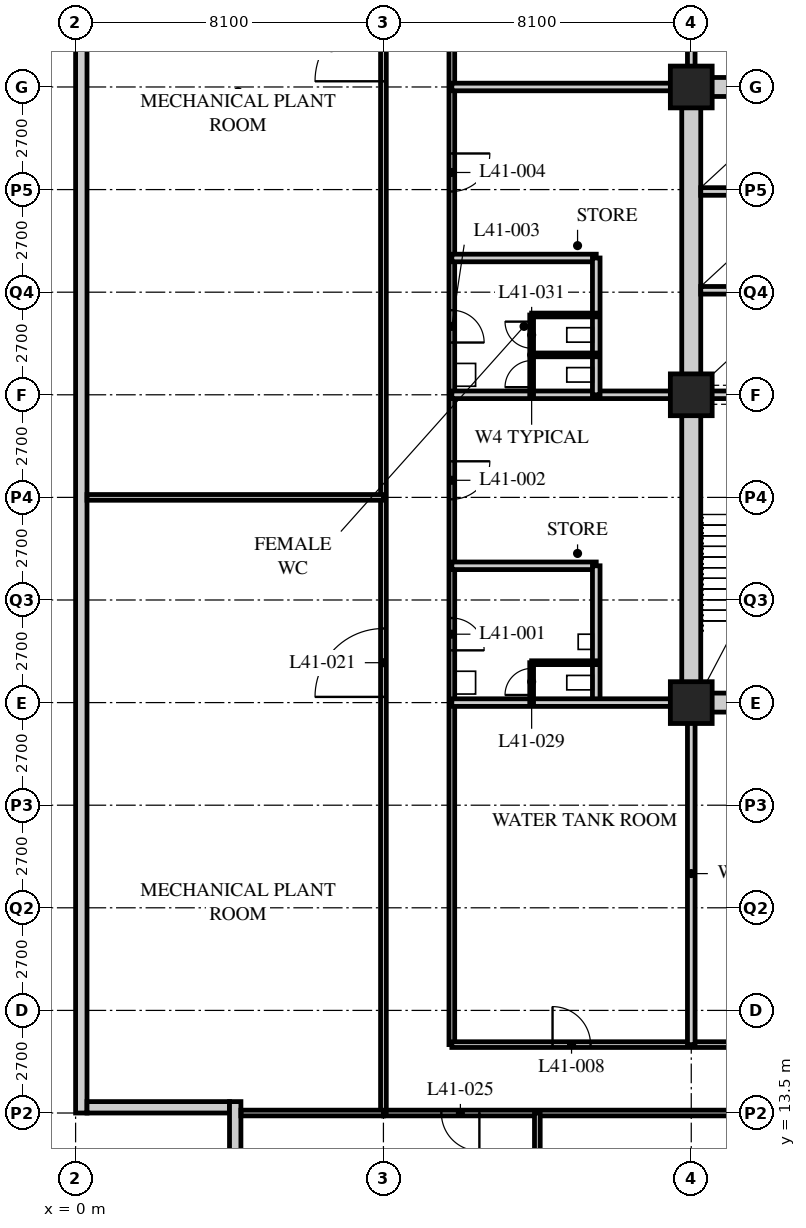
"""IFC4 building model, lengths in metres.
Left out: names, types, materials, properties, quantities, classifications, styles, units other than length and angle.
Written with IfcOpenShell. Run it as: python <this file> out.ifc"""

import sys

from ifc_helpers import new_model, si_unit, direction, frame, frame_2d, origin, origin_2d, place, context, subcontext, project, spatial, rectangle, hollow_rectangle, extrude, element, fill, save


model = new_model("IFC4")
c1 = context("Model", 3, precision=1e-05, world=origin(), true_north=direction((0.0, 1.0)))
c2 = subcontext(c1, "Body", "Model", "MODEL_VIEW")
j1 = project(units=[si_unit("LENGTHUNIT", "METRE"), si_unit("PLANEANGLEUNIT", "RADIAN")], contexts=[c1])
p1 = place(None, origin())
s1 = spatial("IfcSite", under=j1, at=p1, CompositionType="ELEMENT")
p2 = place(p1, origin())
s2 = spatial("IfcBuilding", under=s1, at=p2, CompositionType="ELEMENT")
p3 = place(p2, frame((0.0, 0.0, 157.8)))
s3 = spatial("IfcBuildingStorey", under=s2, at=p3, CompositionType="ELEMENT", Elevation=157.8)
for number, where, z_axis, x_axis in (
    (1, (16.2, 24.3, 0.0), (0.0, 0.0, 1.0), (1.0, 0.0, 0.0)),
    (2, (16.2, 32.4, 0.0), (0.0, 0.0, 1.0), (1.0, 0.0, 0.0)),
    (3, (16.2, 40.5, 0.0), (0.0, 0.0, 1.0), (1.0, 0.0, 0.0)),
):
    element("IfcColumn", number, at=place(p3, frame(where, z_axis=z_axis, x_axis=x_axis)), inside=s3, PredefinedType="COLUMN", context=c2, shape_type="SweptSolid", body=[
        extrude(hollow_rectangle(XDim=1.1, YDim=1.1, WallThickness=0.1, at=origin_2d()), origin(), (0.0, 0.0, 1.0), 7.2),
    ])
p4 = place(p3, frame((0.15, 45.6, 0.0), z_axis=(0.0, 0.0, 1.0), x_axis=(0.0, -1.0, 0.0)))
e4 = element("IfcWall", 4, at=p4, inside=s3, PredefinedType="SOLIDWALL", context=c2, shape_type="SweptSolid", body=[
    extrude(rectangle(XDim=32.1, YDim=0.3, at=frame_2d((16.05, 0.0))), origin(), (0.0, 0.0, 1.0), 5.95),
])
p5 = place(p3, frame((0.3, 13.65, 0.0), z_axis=(0.0, 0.0, 1.0), x_axis=(1.0, 0.0, 0.0)))
e5 = element("IfcWall", 5, at=p5, inside=s3, PredefinedType="SOLIDWALL", context=c2, shape_type="SweptSolid", body=[
    extrude(rectangle(XDim=3.75, YDim=0.3, at=frame_2d((1.875, 0.0))), origin(), (0.0, 0.0, 1.0), 6.95),
])
p6 = place(p3, frame((4.2, 13.8, 0.0), z_axis=(0.0, 0.0, 1.0), x_axis=(0.0, -1.0, 0.0)))
e6 = element("IfcWall", 6, at=p6, inside=s3, PredefinedType="SOLIDWALL", context=c2, shape_type="SweptSolid", body=[
    extrude(rectangle(XDim=4.35, YDim=0.3, at=frame_2d((2.175, 0.0))), origin(), (0.0, 0.0, 1.0), 6.25),
])
p7 = place(p3, frame((8.1, 13.5, 0.0), z_axis=(0.0, 0.0, 1.0), x_axis=(1.0, 0.0, 0.0)))
e7 = element("IfcWall", 7, at=p7, inside=s3, PredefinedType="PARTITIONING", context=c2, shape_type="SweptSolid", body=[
    extrude(rectangle(XDim=40.5, YDim=0.15, at=frame_2d((20.25, 0.0))), origin(), (0.0, 0.0, 1.0), 6.95),
])
p8 = place(p7, frame((11.25, 0.0, 0.0)))
e8 = element("IfcOpeningElement", 8, at=p8, cuts=e7, PredefinedType="OPENING", context=c2, shape_type="SweptSolid", body=[
    extrude(rectangle(XDim=1.8, YDim=2.4, at=frame_2d((0.9, 1.2))), frame((0.0, 0.085, 0.0), z_axis=(0.0, -1.0, 0.0), x_axis=(1.0, 0.0, 0.0)), (0.0, 0.0, 1.0), 0.17),
])
p9 = place(p7, frame((27.45, 0.0, 0.0)))
e9 = element("IfcOpeningElement", 9, at=p9, cuts=e7, PredefinedType="OPENING", context=c2, shape_type="SweptSolid", body=[
    extrude(rectangle(XDim=1.8, YDim=2.4, at=frame_2d((0.9, 1.2))), frame((0.0, 0.085, 0.0), z_axis=(0.0, -1.0, 0.0), x_axis=(1.0, 0.0, 0.0)), (0.0, 0.0, 1.0), 0.17),
])
p10 = place(p7, frame((1.525, 0.0, 0.0)))
e10 = element("IfcOpeningElement", 10, at=p10, cuts=e7, PredefinedType="OPENING", context=c2, shape_type="SweptSolid", body=[
    extrude(rectangle(XDim=1.0, YDim=2.1, at=frame_2d((0.5, 1.05))), frame((0.0, 0.085, 0.0), z_axis=(0.0, -1.0, 0.0), x_axis=(1.0, 0.0, 0.0)), (0.0, 0.0, 1.0), 0.17),
])
p11 = place(p7, frame((37.975, 0.0, 0.0)))
e11 = element("IfcOpeningElement", 11, at=p11, cuts=e7, PredefinedType="OPENING", context=c2, shape_type="SweptSolid", body=[
    extrude(rectangle(XDim=1.0, YDim=2.1, at=frame_2d((0.5, 1.05))), frame((0.0, 0.085, 0.0), z_axis=(0.0, -1.0, 0.0), x_axis=(1.0, 0.0, 0.0)), (0.0, 0.0, 1.0), 0.17),
])
p12 = place(p3, frame((8.1, 13.5, 0.0), z_axis=(0.0, 0.0, 1.0), x_axis=(0.0, 1.0, 0.0)))
e12 = element("IfcWall", 12, at=p12, inside=s3, PredefinedType="PARTITIONING", context=c2, shape_type="SweptSolid", body=[
    extrude(rectangle(XDim=32.4, YDim=0.15, at=frame_2d((16.2, 0.0))), origin(), (0.0, 0.0, 1.0), 5.95),
])
p13 = place(p12, frame((10.95, 0.0, 0.0)))
e13 = element("IfcOpeningElement", 13, at=p13, cuts=e12, PredefinedType="OPENING", context=c2, shape_type="SweptSolid", body=[
    extrude(rectangle(XDim=1.8, YDim=2.4, at=frame_2d((0.9, 1.2))), frame((0.0, 0.085, 0.0), z_axis=(0.0, -1.0, 0.0), x_axis=(1.0, 0.0, 0.0)), (0.0, 0.0, 1.0), 0.17),
])
p14 = place(p12, frame((27.15, 0.0, 0.0)))
e14 = element("IfcOpeningElement", 14, at=p14, cuts=e12, PredefinedType="OPENING", context=c2, shape_type="SweptSolid", body=[
    extrude(rectangle(XDim=1.8, YDim=2.4, at=frame_2d((0.9, 1.2))), frame((0.0, 0.085, 0.0), z_axis=(0.0, -1.0, 0.0), x_axis=(1.0, 0.0, 0.0)), (0.0, 0.0, 1.0), 0.17),
])
p15 = place(p3, frame((9.9, 44.1, 0.0), z_axis=(0.0, 0.0, 1.0), x_axis=(0.0, -1.0, 0.0)))
e15 = element("IfcWall", 15, at=p15, inside=s3, PredefinedType="PARTITIONING", context=c2, shape_type="SweptSolid", body=[
    extrude(rectangle(XDim=28.8, YDim=0.15, at=frame_2d((14.4, 0.0))), origin(), (0.0, 0.0, 1.0), 6.95),
])
p16 = place(p15, frame((17.575, 0.0, 0.0)))
e16 = element("IfcOpeningElement", 16, at=p16, cuts=e15, PredefinedType="OPENING", context=c2, shape_type="SweptSolid", body=[
    extrude(rectangle(XDim=0.85, YDim=2.1, at=frame_2d((0.425, 1.05))), frame((0.0, 0.085, 0.0), z_axis=(0.0, -1.0, 0.0), x_axis=(1.0, 0.0, 0.0)), (0.0, 0.0, 1.0), 0.17),
])
p17 = place(p15, frame((13.45, 0.0, 0.0)))
e17 = element("IfcOpeningElement", 17, at=p17, cuts=e15, PredefinedType="OPENING", context=c2, shape_type="SweptSolid", body=[
    extrude(rectangle(XDim=1.0, YDim=2.1, at=frame_2d((0.5, 1.05))), frame((0.0, 0.085, 0.0), z_axis=(0.0, -1.0, 0.0), x_axis=(1.0, 0.0, 0.0)), (0.0, 0.0, 1.0), 0.17),
])
p18 = place(p15, frame((9.475, 0.0, 0.0)))
e18 = element("IfcOpeningElement", 18, at=p18, cuts=e15, PredefinedType="OPENING", context=c2, shape_type="SweptSolid", body=[
    extrude(rectangle(XDim=0.85, YDim=2.1, at=frame_2d((0.425, 1.05))), frame((0.0, 0.085, 0.0), z_axis=(0.0, -1.0, 0.0), x_axis=(1.0, 0.0, 0.0)), (0.0, 0.0, 1.0), 0.17),
])
p19 = place(p15, frame((5.35, 0.0, 0.0)))
e19 = element("IfcOpeningElement", 19, at=p19, cuts=e15, PredefinedType="OPENING", context=c2, shape_type="SweptSolid", body=[
    extrude(rectangle(XDim=1.0, YDim=2.1, at=frame_2d((0.5, 1.05))), frame((0.0, 0.085, 0.0), z_axis=(0.0, -1.0, 0.0), x_axis=(1.0, 0.0, 0.0)), (0.0, 0.0, 1.0), 0.17),
])
p20 = place(p3, frame((9.9, 15.3, 0.0), z_axis=(0.0, 0.0, 1.0), x_axis=(1.0, 0.0, 0.0)))
e20 = element("IfcWall", 20, at=p20, inside=s3, PredefinedType="PARTITIONING", context=c2, shape_type="SweptSolid", body=[
    extrude(rectangle(XDim=17.24, YDim=0.15, at=frame_2d((8.62, 0.0))), origin(), (0.0, 0.0, 1.0), 6.95),
])
p21 = place(p20, frame((2.65, 0.0, 0.0)))
e21 = element("IfcOpeningElement", 21, at=p21, cuts=e20, PredefinedType="OPENING", context=c2, shape_type="SweptSolid", body=[
    extrude(rectangle(XDim=1.0, YDim=2.1, at=frame_2d((0.5, 1.05))), frame((0.0, 0.085, 0.0), z_axis=(0.0, -1.0, 0.0), x_axis=(1.0, 0.0, 0.0)), (0.0, 0.0, 1.0), 0.17),
])
p22 = place(p20, frame((11.275, 0.0, 0.0)))
e22 = element("IfcOpeningElement", 22, at=p22, cuts=e20, PredefinedType="OPENING", context=c2, shape_type="SweptSolid", body=[
    extrude(rectangle(XDim=1.0, YDim=2.1, at=frame_2d((0.5, 1.05))), frame((0.0, 0.085, 0.0), z_axis=(0.0, -1.0, 0.0), x_axis=(1.0, 0.0, 0.0)), (0.0, 0.0, 1.0), 0.17),
])
p23 = place(p3, frame((9.9, 32.4, 0.0), z_axis=(0.0, 0.0, 1.0), x_axis=(1.0, 0.0, 0.0)))
e23 = element("IfcWall", 23, at=p23, inside=s3, PredefinedType="SOLIDWALL", context=c2, shape_type="SweptSolid", body=[
    extrude(rectangle(XDim=6.3, YDim=0.2, at=frame_2d((3.15, 0.0))), origin(), (0.0, 0.0, 1.0), 6.95),
])
p24 = place(p3, frame((9.9, 27.9, 0.0), z_axis=(0.0, 0.0, 1.0), x_axis=(1.0, 0.0, 0.0)))
e24 = element("IfcWall", 24, at=p24, inside=s3, PredefinedType="SOLIDWALL", context=c2, shape_type="SweptSolid", body=[
    extrude(rectangle(XDim=3.8, YDim=0.2, at=frame_2d((1.9, 0.0))), origin(), (0.0, 0.0, 1.0), 6.95),
])
p25 = place(p3, frame((13.7, 24.3, 0.0), z_axis=(0.0, 0.0, 1.0), x_axis=(0.0, 1.0, 0.0)))
e25 = element("IfcWall", 25, at=p25, inside=s3, PredefinedType="SOLIDWALL", context=c2, shape_type="SweptSolid", body=[
    extrude(rectangle(XDim=3.6, YDim=0.2, at=frame_2d((1.8, 0.0))), origin(), (0.0, 0.0, 1.0), 6.95),
])
p26 = place(p3, frame((9.9, 36.0, 0.0), z_axis=(0.0, 0.0, 1.0), x_axis=(1.0, 0.0, 0.0)))
e26 = element("IfcWall", 26, at=p26, inside=s3, PredefinedType="SOLIDWALL", context=c2, shape_type="SweptSolid", body=[
    extrude(rectangle(XDim=3.8, YDim=0.2, at=frame_2d((1.9, 0.0))), origin(), (0.0, 0.0, 1.0), 6.95),
])
p27 = place(p3, frame((13.7, 32.4, 0.0), z_axis=(0.0, 0.0, 1.0), x_axis=(0.0, 1.0, 0.0)))
e27 = element("IfcWall", 27, at=p27, inside=s3, PredefinedType="SOLIDWALL", context=c2, shape_type="SweptSolid", body=[
    extrude(rectangle(XDim=3.6, YDim=0.2, at=frame_2d((1.8, 0.0))), origin(), (0.0, 0.0, 1.0), 6.95),
])
p28 = place(p3, frame((16.2, 15.3, 0.0), z_axis=(0.0, 0.0, 1.0), x_axis=(0.0, 1.0, 0.0)))
e28 = element("IfcWall", 28, at=p28, inside=s3, PredefinedType="SOLIDWALL", context=c2, shape_type="SweptSolid", body=[
    extrude(rectangle(XDim=9.0, YDim=0.2, at=frame_2d((4.5, 0.0))), origin(), (0.0, 0.0, 1.0), 5.95),
])
p29 = place(p3, frame((16.2, 40.5, 0.0), z_axis=(0.0, 0.0, 1.0), x_axis=(0.0, 1.0, 0.0)))
e29 = element("IfcWall", 29, at=p29, inside=s3, PredefinedType="SOLIDWALL", context=c2, shape_type="SweptSolid", body=[
    extrude(rectangle(XDim=3.6, YDim=0.2, at=frame_2d((1.8, 0.0))), origin(), (0.0, 0.0, 1.0), 5.95),
])
for number, where, z_axis, x_axis in (
    (30, (9.9, 24.3, 0.0), (0.0, 0.0, 1.0), (1.0, 0.0, 0.0)),
    (31, (9.9, 40.5, 0.0), (0.0, 0.0, 1.0), (1.0, 0.0, 0.0)),
):
    element("IfcWall", number, at=place(p3, frame(where, z_axis=z_axis, x_axis=x_axis)), inside=s3, PredefinedType="SOLIDWALL", context=c2, shape_type="SweptSolid", body=[
        extrude(rectangle(XDim=6.3, YDim=0.2, at=frame_2d((3.15, 0.0))), origin(), (0.0, 0.0, 1.0), 6.95),
    ])
p30 = place(p3, frame((8.1, 29.7, 0.0), z_axis=(0.0, 0.0, 1.0), x_axis=(-1.0, 0.0, 0.0)))
e32 = element("IfcWall", 32, at=p30, inside=s3, PredefinedType="PARTITIONING", context=c2, shape_type="SweptSolid", body=[
    extrude(rectangle(XDim=7.8, YDim=0.15, at=frame_2d((3.9, 0.0))), origin(), (0.0, 0.0, 1.0), 6.95),
])
p31 = place(p3, frame((4.35, 13.5, 0.0), z_axis=(0.0, 0.0, 1.0), x_axis=(1.0, 0.0, 0.0)))
e33 = element("IfcWall", 33, at=p31, inside=s3, PredefinedType="PARTITIONING", context=c2, shape_type="SweptSolid", body=[
    extrude(rectangle(XDim=3.75, YDim=0.15, at=frame_2d((1.875, 0.0))), origin(), (0.0, 0.0, 1.0), 6.95),
])
p32 = place(p3, frame((12.15, 13.5, 0.0), z_axis=(0.0, 0.0, 1.0), x_axis=(0.0, -1.0, 0.0)))
e34 = element("IfcWall", 34, at=p32, inside=s3, PredefinedType="PARTITIONING", context=c2, shape_type="SweptSolid", body=[
    extrude(rectangle(XDim=7.8, YDim=0.15, at=frame_2d((3.9, 0.0))), origin(), (0.0, 0.0, 1.0), 6.95),
])
p33 = place(p3, frame((12.0, 24.3, 0.0), z_axis=(0.0, 0.0, 1.0), x_axis=(0.0, 1.0, 0.0)))
e35 = element("IfcWall", 35, at=p33, inside=s3, PredefinedType="PARTITIONING", context=c2, shape_type="SweptSolid", body=[
    extrude(rectangle(XDim=1.05, YDim=0.1, at=frame_2d((0.525, 0.0))), origin(), (0.0, 0.0, 1.0), 6.95),
])
p34 = place(p33, frame((0.2, 0.0, 0.0)))
e36 = element("IfcOpeningElement", 36, at=p34, cuts=e35, PredefinedType="OPENING", context=c2, shape_type="SweptSolid", body=[
    extrude(rectangle(XDim=0.7, YDim=2.0, at=frame_2d((0.35, 1.0))), frame((0.0, 0.06, 0.0), z_axis=(0.0, -1.0, 0.0), x_axis=(1.0, 0.0, 0.0)), (0.0, 0.0, 1.0), 0.12),
])
p35 = place(p3, frame((12.0, 25.35, 0.0), z_axis=(0.0, 0.0, 1.0), x_axis=(1.0, 0.0, 0.0)))
e37 = element("IfcWall", 37, at=p35, inside=s3, PredefinedType="PARTITIONING", context=c2, shape_type="SweptSolid", body=[
    extrude(rectangle(XDim=1.7, YDim=0.1, at=frame_2d((0.85, 0.0))), origin(), (0.0, 0.0, 1.0), 6.95),
])
p36 = place(p3, frame((12.0, 32.4, 0.0), z_axis=(0.0, 0.0, 1.0), x_axis=(0.0, 1.0, 0.0)))
e38 = element("IfcWall", 38, at=p36, inside=s3, PredefinedType="PARTITIONING", context=c2, shape_type="SweptSolid", body=[
    extrude(rectangle(XDim=2.1, YDim=0.1, at=frame_2d((1.05, 0.0))), origin(), (0.0, 0.0, 1.0), 6.95),
])
p37 = place(p36, frame((0.2, 0.0, 0.0)))
e39 = element("IfcOpeningElement", 39, at=p37, cuts=e38, PredefinedType="OPENING", context=c2, shape_type="SweptSolid", body=[
    extrude(rectangle(XDim=0.7, YDim=2.0, at=frame_2d((0.35, 1.0))), frame((0.0, 0.06, 0.0), z_axis=(0.0, -1.0, 0.0), x_axis=(1.0, 0.0, 0.0)), (0.0, 0.0, 1.0), 0.12),
])
p38 = place(p36, frame((1.225, 0.0, 0.0)))
e40 = element("IfcOpeningElement", 40, at=p38, cuts=e38, PredefinedType="OPENING", context=c2, shape_type="SweptSolid", body=[
    extrude(rectangle(XDim=0.7, YDim=2.0, at=frame_2d((0.35, 1.0))), frame((0.0, 0.06, 0.0), z_axis=(0.0, -1.0, 0.0), x_axis=(1.0, 0.0, 0.0)), (0.0, 0.0, 1.0), 0.12),
])
for number, where, z_axis, x_axis in (
    (41, (12.0, 33.45, 0.0), (0.0, 0.0, 1.0), (1.0, 0.0, 0.0)),
    (42, (12.0, 34.5, 0.0), (0.0, 0.0, 1.0), (1.0, 0.0, 0.0)),
):
    element("IfcWall", number, at=place(p3, frame(where, z_axis=z_axis, x_axis=x_axis)), inside=s3, PredefinedType="PARTITIONING", context=c2, shape_type="SweptSolid", body=[
        extrude(rectangle(XDim=1.7, YDim=0.1, at=frame_2d((0.85, 0.0))), origin(), (0.0, 0.0, 1.0), 6.95),
    ])
p39 = place(p3, frame((15.95, 24.3, 0.0), z_axis=(0.0, 0.0, 1.0), x_axis=(1.0, 0.0, 0.0)))
e43 = element("IfcWall", 43, at=p39, inside=s3, PredefinedType="SOLIDWALL", context=c2, shape_type="SweptSolid", body=[
    extrude(rectangle(XDim=24.8, YDim=0.5, at=frame_2d((12.4, 0.0))), origin(), (0.0, 0.0, 1.0), 6.18),
])
p40 = place(p39, frame((11.5, 0.0, 0.0)))
e44 = element("IfcOpeningElement", 44, at=p40, cuts=e43, PredefinedType="OPENING", context=c2, shape_type="SweptSolid", body=[
    extrude(rectangle(XDim=1.8, YDim=2.4, at=frame_2d((0.9, 1.2))), frame((0.0, 0.26, 0.0), z_axis=(0.0, -1.0, 0.0), x_axis=(1.0, 0.0, 0.0)), (0.0, 0.0, 1.0), 0.52),
])
p41 = place(p3, frame((15.95, 40.5, 0.0), z_axis=(0.0, 0.0, 1.0), x_axis=(1.0, 0.0, 0.0)))
e45 = element("IfcWall", 45, at=p41, inside=s3, PredefinedType="SOLIDWALL", context=c2, shape_type="SweptSolid", body=[
    extrude(rectangle(XDim=24.8, YDim=0.5, at=frame_2d((12.4, 0.0))), origin(), (0.0, 0.0, 1.0), 6.18),
])
p42 = place(p41, frame((11.5, 0.0, 0.0)))
e46 = element("IfcOpeningElement", 46, at=p42, cuts=e45, PredefinedType="OPENING", context=c2, shape_type="SweptSolid", body=[
    extrude(rectangle(XDim=1.8, YDim=2.4, at=frame_2d((0.9, 1.2))), frame((0.0, 0.26, 0.0), z_axis=(0.0, -1.0, 0.0), x_axis=(1.0, 0.0, 0.0)), (0.0, 0.0, 1.0), 0.52),
])
p43 = place(p3, frame((16.2, 24.55, 0.0), z_axis=(0.0, 0.0, 1.0), x_axis=(0.0, 1.0, 0.0)))
e47 = element("IfcWall", 47, at=p43, inside=s3, PredefinedType="SOLIDWALL", context=c2, shape_type="SweptSolid", body=[
    extrude(rectangle(XDim=15.7, YDim=0.5, at=frame_2d((7.85, 0.0))), origin(), (0.0, 0.0, 1.0), 5.95),
])
p44 = place(p3, frame((16.45, 32.4, 0.0), z_axis=(0.0, 0.0, 1.0), x_axis=(1.0, 0.0, 0.0)))
e48 = element("IfcWall", 48, at=p44, inside=s3, PredefinedType="SOLIDWALL", context=c2, shape_type="SweptSolid", body=[
    extrude(rectangle(XDim=7.95, YDim=0.2, at=frame_2d((3.975, 0.0))), origin(), (0.0, 0.0, 1.0), 6.25),
])
for number, where, z_axis, x_axis in (
    (49, (16.45, 35.15, 0.0), (0.0, 0.0, 1.0), (1.0, 0.0, 0.0)),
    (50, (16.45, 37.75, 0.0), (0.0, 0.0, 1.0), (1.0, 0.0, 0.0)),
):
    element("IfcWall", number, at=place(p3, frame(where, z_axis=z_axis, x_axis=x_axis)), inside=s3, PredefinedType="SOLIDWALL", context=c2, shape_type="SweptSolid", body=[
        extrude(rectangle(XDim=2.6, YDim=0.2, at=frame_2d((1.3, 0.0))), origin(), (0.0, 0.0, 1.0), 6.95),
    ])
p45 = place(p16, origin())
e51 = element("IfcDoor", 51, at=p45, inside=s3, OperationType="SINGLE_SWING_RIGHT", PredefinedType="DOOR", context=c2, shape_type="SweptSolid", body=[
    extrude(rectangle(XDim=0.85, YDim=2.1, at=frame_2d((0.425, 1.05))), frame((0.0, 0.025, 0.0), z_axis=(0.0, -1.0, 0.0), x_axis=(1.0, 0.0, 0.0)), (0.0, 0.0, 1.0), 0.05),
])
fill(e16, e51)
p46 = place(p17, origin())
e52 = element("IfcDoor", 52, at=p46, inside=s3, OperationType="SINGLE_SWING_LEFT", PredefinedType="DOOR", context=c2, shape_type="SweptSolid", body=[
    extrude(rectangle(XDim=1.0, YDim=2.1, at=frame_2d((0.5, 1.05))), frame((0.0, 0.025, 0.0), z_axis=(0.0, -1.0, 0.0), x_axis=(1.0, 0.0, 0.0)), (0.0, 0.0, 1.0), 0.05),
])
fill(e17, e52)
p47 = place(p18, origin())
e53 = element("IfcDoor", 53, at=p47, inside=s3, OperationType="SINGLE_SWING_RIGHT", PredefinedType="DOOR", context=c2, shape_type="SweptSolid", body=[
    extrude(rectangle(XDim=0.85, YDim=2.1, at=frame_2d((0.425, 1.05))), frame((0.0, 0.025, 0.0), z_axis=(0.0, -1.0, 0.0), x_axis=(1.0, 0.0, 0.0)), (0.0, 0.0, 1.0), 0.05),
])
fill(e18, e53)
p48 = place(p19, origin())
e54 = element("IfcDoor", 54, at=p48, inside=s3, OperationType="SINGLE_SWING_LEFT", PredefinedType="DOOR", context=c2, shape_type="SweptSolid", body=[
    extrude(rectangle(XDim=1.0, YDim=2.1, at=frame_2d((0.5, 1.05))), frame((0.0, 0.025, 0.0), z_axis=(0.0, -1.0, 0.0), x_axis=(1.0, 0.0, 0.0)), (0.0, 0.0, 1.0), 0.05),
])
fill(e19, e54)
p49 = place(p21, origin())
e55 = element("IfcDoor", 55, at=p49, inside=s3, OperationType="SINGLE_SWING_LEFT", PredefinedType="DOOR", context=c2, shape_type="SweptSolid", body=[
    extrude(rectangle(XDim=1.0, YDim=2.1, at=frame_2d((0.5, 1.05))), frame((0.0, 0.025, 0.0), z_axis=(0.0, -1.0, 0.0), x_axis=(1.0, 0.0, 0.0)), (0.0, 0.0, 1.0), 0.05),
])
fill(e21, e55)
p50 = place(p13, origin())
e56 = element("IfcDoor", 56, at=p50, inside=s3, OperationType="DOUBLE_DOOR_SINGLE_SWING", PredefinedType="DOOR", context=c2, shape_type="SweptSolid", body=[
    extrude(rectangle(XDim=1.8, YDim=2.4, at=frame_2d((0.9, 1.2))), frame((0.0, 0.025, 0.0), z_axis=(0.0, -1.0, 0.0), x_axis=(1.0, 0.0, 0.0)), (0.0, 0.0, 1.0), 0.05),
])
fill(e13, e56)
p51 = place(p14, origin())
e57 = element("IfcDoor", 57, at=p51, inside=s3, OperationType="DOUBLE_DOOR_SINGLE_SWING", PredefinedType="DOOR", context=c2, shape_type="SweptSolid", body=[
    extrude(rectangle(XDim=1.8, YDim=2.4, at=frame_2d((0.9, 1.2))), frame((0.0, 0.025, 0.0), z_axis=(0.0, -1.0, 0.0), x_axis=(1.0, 0.0, 0.0)), (0.0, 0.0, 1.0), 0.05),
])
fill(e14, e57)
p52 = place(p10, origin())
e58 = element("IfcDoor", 58, at=p52, inside=s3, OperationType="SINGLE_SWING_LEFT", PredefinedType="DOOR", context=c2, shape_type="SweptSolid", body=[
    extrude(rectangle(XDim=1.0, YDim=2.1, at=frame_2d((0.5, 1.05))), frame((0.0, 0.025, 0.0), z_axis=(0.0, -1.0, 0.0), x_axis=(1.0, 0.0, 0.0)), (0.0, 0.0, 1.0), 0.05),
])
fill(e10, e58)
p53 = place(p34, origin())
e59 = element("IfcDoor", 59, at=p53, inside=s3, OperationType="SINGLE_SWING_LEFT", PredefinedType="DOOR", context=c2, shape_type="SweptSolid", body=[
    extrude(rectangle(XDim=0.7, YDim=2.0, at=frame_2d((0.35, 1.0))), frame((0.0, 0.025, 0.0), z_axis=(0.0, -1.0, 0.0), x_axis=(1.0, 0.0, 0.0)), (0.0, 0.0, 1.0), 0.05),
])
fill(e36, e59)
p54 = place(p37, origin())
e60 = element("IfcDoor", 60, at=p54, inside=s3, OperationType="SINGLE_SWING_LEFT", PredefinedType="DOOR", context=c2, shape_type="SweptSolid", body=[
    extrude(rectangle(XDim=0.7, YDim=2.0, at=frame_2d((0.35, 1.0))), frame((0.0, 0.025, 0.0), z_axis=(0.0, -1.0, 0.0), x_axis=(1.0, 0.0, 0.0)), (0.0, 0.0, 1.0), 0.05),
])
fill(e39, e60)
p55 = place(p38, origin())
e61 = element("IfcDoor", 61, at=p55, inside=s3, OperationType="SINGLE_SWING_RIGHT", PredefinedType="DOOR", context=c2, shape_type="SweptSolid", body=[
    extrude(rectangle(XDim=0.7, YDim=2.0, at=frame_2d((0.35, 1.0))), frame((0.0, 0.025, 0.0), z_axis=(0.0, -1.0, 0.0), x_axis=(1.0, 0.0, 0.0)), (0.0, 0.0, 1.0), 0.05),
])
fill(e40, e61)
save(model, sys.argv[1])
